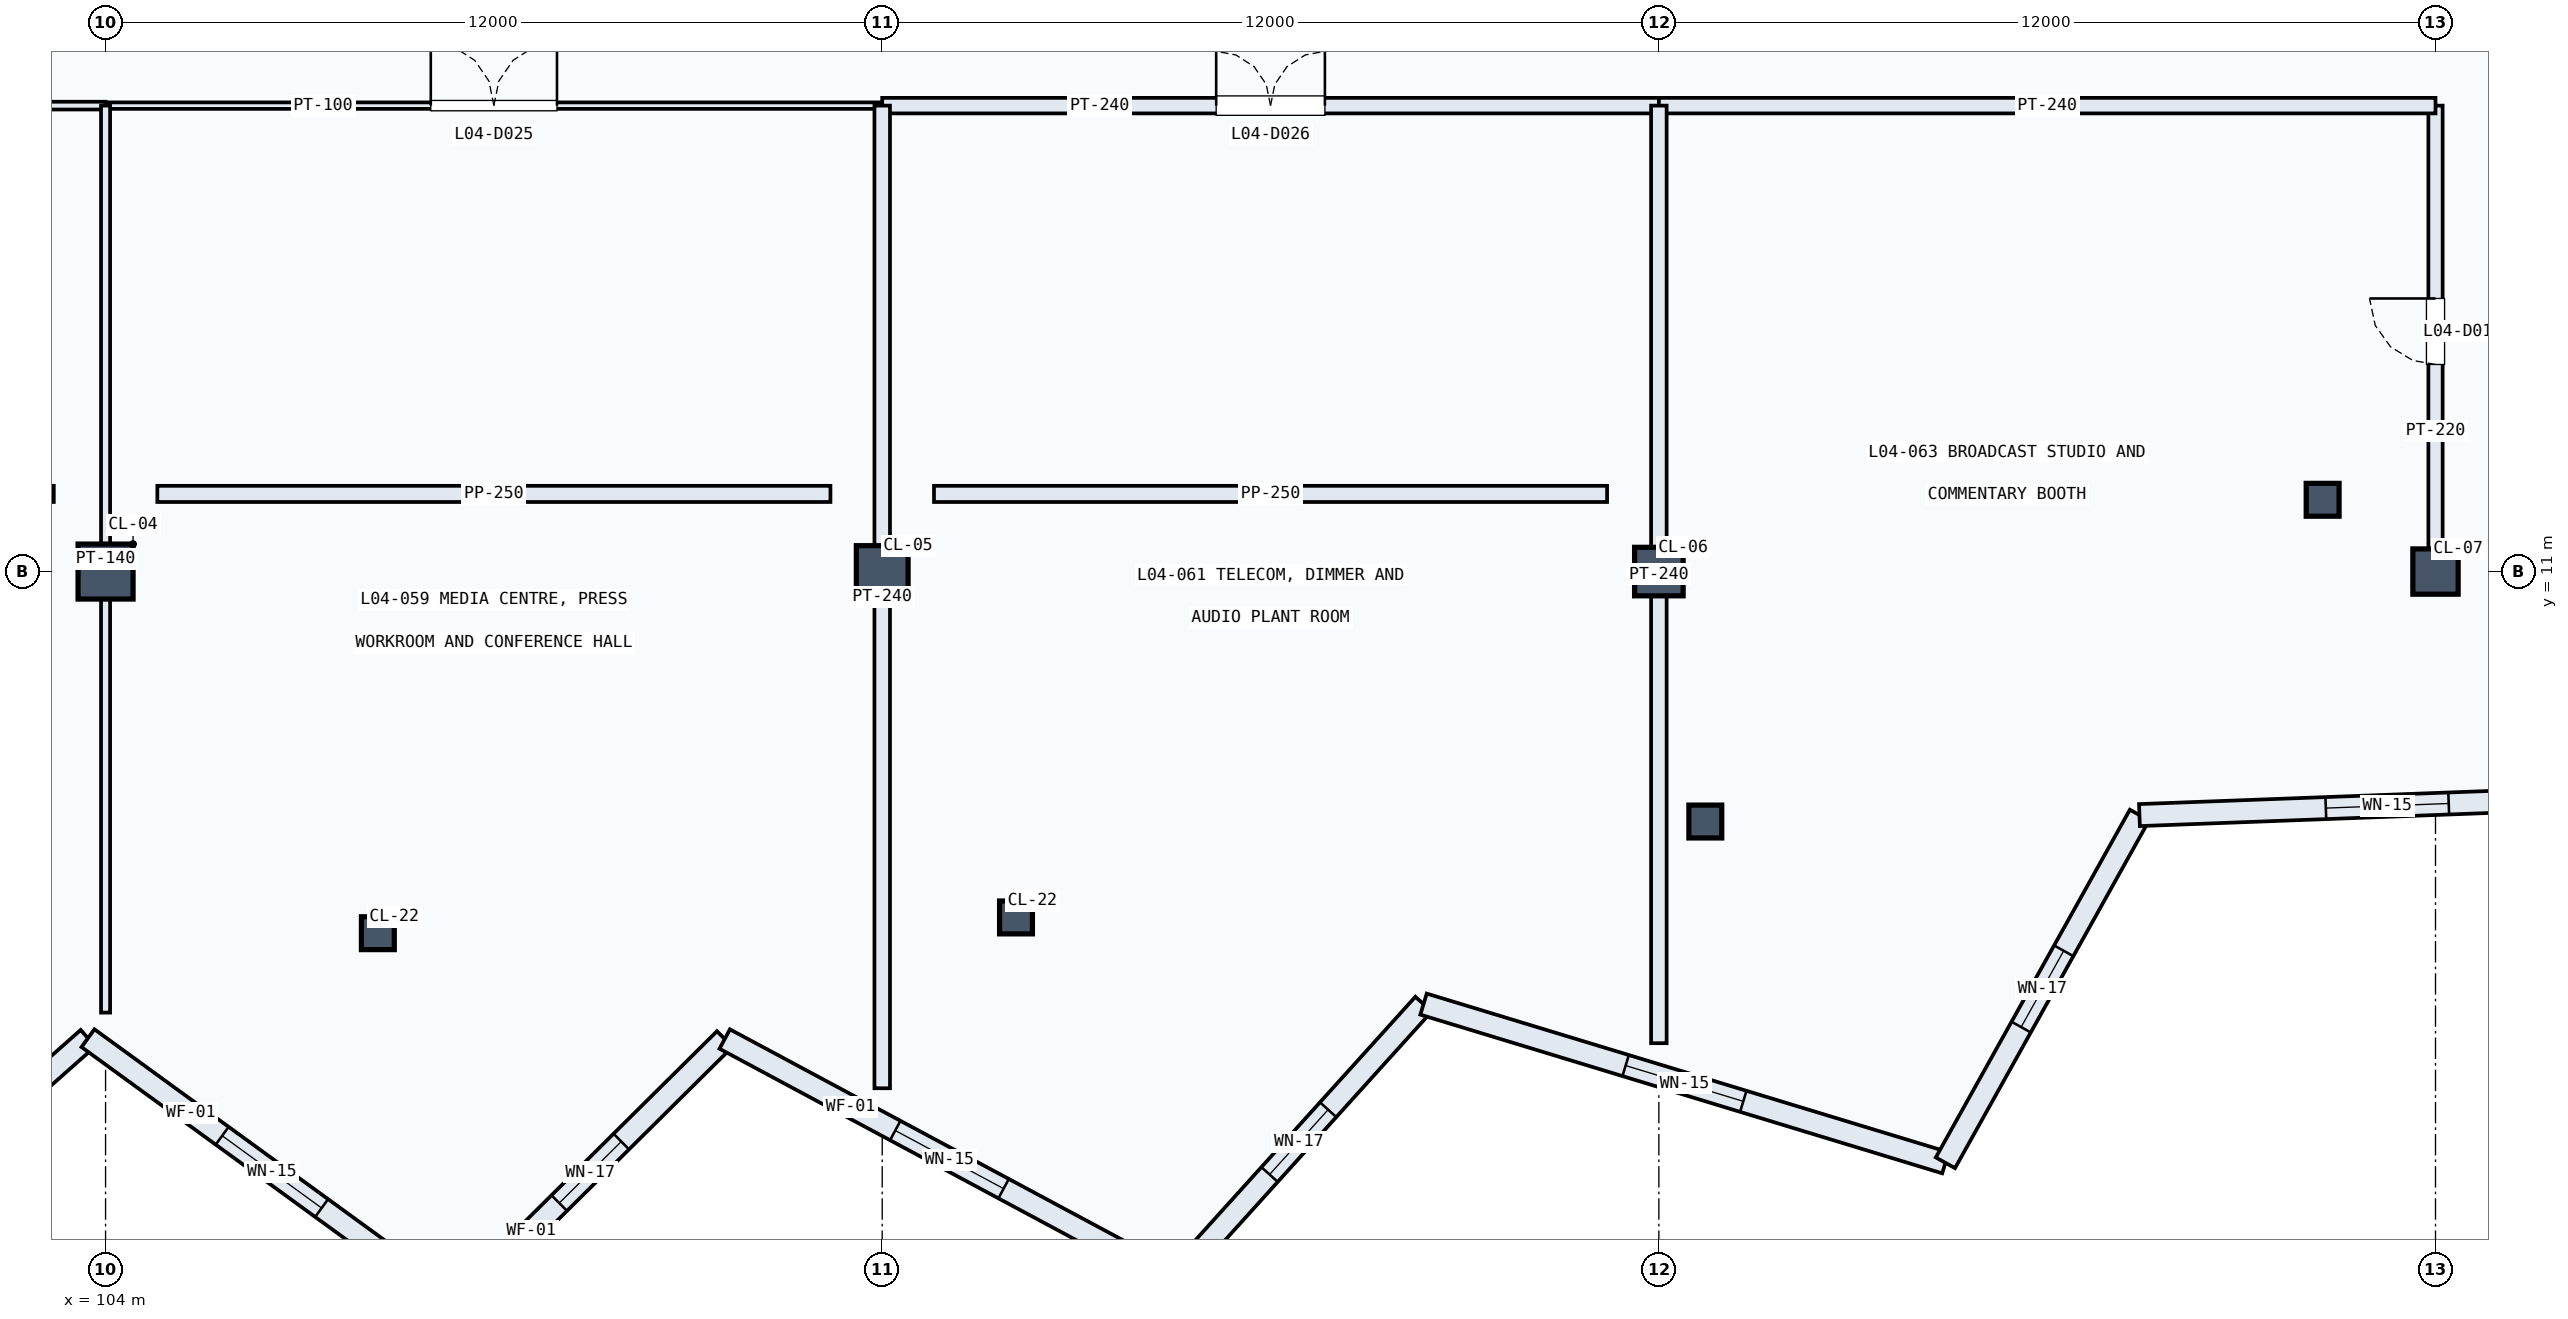
"""IFC4 building model, lengths in metres.
Left out: names, types, materials, properties, quantities, classifications, styles, units other than length and angle.
Written with IfcOpenShell. Run it as: python <this file> out.ifc"""

import sys

from ifc_helpers import new_model, si_unit, direction, frame, frame_2d, origin, origin_2d, place, context, subcontext, project, spatial, rectangle, hollow_circle, extrude, element, fill, save


model = new_model("IFC4")
c1 = context("Model", 3, precision=1e-05, world=origin(), true_north=direction((0.0, 1.0)))
c2 = subcontext(c1, "Body", "Model", "MODEL_VIEW")
j1 = project(units=[si_unit("LENGTHUNIT", "METRE"), si_unit("PLANEANGLEUNIT", "RADIAN")], contexts=[c1])
p1 = place(None, origin())
s1 = spatial("IfcSite", under=j1, at=p1, CompositionType="ELEMENT")
p2 = place(p1, origin())
s2 = spatial("IfcBuilding", under=s1, at=p2, CompositionType="ELEMENT")
p3 = place(p2, frame((0.0, 0.0, 19.5)))
s3 = spatial("IfcBuildingStorey", under=s2, at=p3, CompositionType="ELEMENT", Elevation=19.5)
p4 = place(p3, frame((104.0, 11.0, 0.0), z_axis=(0.0, 0.0, 1.0), x_axis=(1.0, 0.0, 0.0)))
e1 = element("IfcColumn", 1, at=p4, inside=s3, PredefinedType="COLUMN", context=c2, shape_type="SweptSolid", body=[
    extrude(rectangle(XDim=0.85, YDim=0.85, at=origin_2d()), origin(), (0.0, 0.0, 1.0), 4.8),
])
p5 = place(p3, frame((116.0, 11.0, 0.0), z_axis=(0.0, 0.0, 1.0), x_axis=(1.0, 0.0, 0.0)))
e2 = element("IfcColumn", 2, at=p5, inside=s3, PredefinedType="COLUMN", context=c2, shape_type="SweptSolid", body=[
    extrude(rectangle(XDim=0.8, YDim=0.8, at=origin_2d()), origin(), (0.0, 0.0, 1.0), 4.8),
])
p6 = place(p3, frame((128.0, 11.0, 0.0), z_axis=(0.0, 0.0, 1.0), x_axis=(1.0, 0.0, 0.0)))
e3 = element("IfcColumn", 3, at=p6, inside=s3, PredefinedType="COLUMN", context=c2, shape_type="SweptSolid", body=[
    extrude(rectangle(XDim=0.75, YDim=0.75, at=origin_2d()), origin(), (0.0, 0.0, 1.0), 4.8),
])
p7 = place(p3, frame((140.0, 11.0, 0.0), z_axis=(0.0, 0.0, 1.0), x_axis=(1.0, 0.0, 0.0)))
e4 = element("IfcColumn", 4, at=p7, inside=s3, PredefinedType="COLUMN", context=c2, shape_type="SweptSolid", body=[
    extrude(rectangle(XDim=0.7, YDim=0.7, at=origin_2d()), origin(), (0.0, 0.0, 1.0), 4.8),
])
for number, where, z_axis, x_axis in (
    (5, (108.207, 5.412, 0.0), (0.0, 0.0, 1.0), (1.0, 0.0, 0.0)),
    (6, (118.067, 5.655, 0.0), (0.0, 0.0, 1.0), (1.0, 0.0, 0.0)),
    (7, (128.718, 7.137, 0.0), (0.0, 0.0, 1.0), (1.0, 0.0, 0.0)),
    (8, (138.256, 12.109, 0.0), (0.0, 0.0, 1.0), (1.0, 0.0, 0.0)),
):
    element("IfcColumn", number, at=place(p3, frame(where, z_axis=z_axis, x_axis=x_axis)), inside=s3, PredefinedType="COLUMN", context=c2, shape_type="SweptSolid", body=[
        extrude(hollow_circle(Radius=0.254, WallThickness=0.02, at=origin_2d()), origin(), (0.0, 0.0, 1.0), 4.8),
    ])
p8 = place(p3, frame((99.0, -0.4, 0.0), z_axis=(0.0, 0.0, 1.0), x_axis=(0.74844895461, 0.663192402205, 0.0)))
e9 = element("IfcWall", 9, at=p8, inside=s3, PredefinedType="USERDEFINED", context=c2, shape_type="SweptSolid", body=[
    extrude(rectangle(XDim=6.317, YDim=0.34, at=frame_2d((3.159, 0.0))), origin(), (0.0, 0.0, 1.0), 4.455),
])
p9 = place(p8, frame((2.484, 0.0, 0.8)))
e10 = element("IfcOpeningElement", 10, at=p9, cuts=e9, PredefinedType="OPENING", context=c2, shape_type="SweptSolid", body=[
    extrude(rectangle(XDim=1.35, YDim=2.1, at=frame_2d((0.675, 1.05))), frame((0.0, 0.18, 0.0), z_axis=(0.0, -1.0, 0.0), x_axis=(1.0, 0.0, 0.0)), (0.0, 0.0, 1.0), 0.36),
])
p10 = place(p3, frame((103.728, 3.79, 0.0), z_axis=(0.0, 0.0, 1.0), x_axis=(0.808841233488, -0.588027090371, 0.0)))
e11 = element("IfcWall", 11, at=p10, inside=s3, PredefinedType="USERDEFINED", context=c2, shape_type="SweptSolid", body=[
    extrude(rectangle(XDim=7.027, YDim=0.34, at=frame_2d((3.514, 0.0))), origin(), (0.0, 0.0, 1.0), 4.455),
])
p11 = place(p10, frame((2.564, 0.0, 0.85)))
e12 = element("IfcOpeningElement", 12, at=p11, cuts=e11, PredefinedType="OPENING", context=c2, shape_type="SweptSolid", body=[
    extrude(rectangle(XDim=1.9, YDim=1.6, at=frame_2d((0.95, 0.8))), frame((0.0, 0.18, 0.0), z_axis=(0.0, -1.0, 0.0), x_axis=(1.0, 0.0, 0.0)), (0.0, 0.0, 1.0), 0.36),
])
p12 = place(p3, frame((109.412, -0.343, 0.0), z_axis=(0.0, 0.0, 1.0), x_axis=(0.710084208502, 0.704116763638, 0.0)))
e13 = element("IfcWall", 13, at=p12, inside=s3, PredefinedType="USERDEFINED", context=c2, shape_type="SweptSolid", body=[
    extrude(rectangle(XDim=5.85, YDim=0.34, at=frame_2d((2.925, 0.0))), origin(), (0.0, 0.0, 1.0), 4.455),
])
p13 = place(p12, frame((2.25, 0.0, 0.8)))
e14 = element("IfcOpeningElement", 14, at=p13, cuts=e13, PredefinedType="OPENING", context=c2, shape_type="SweptSolid", body=[
    extrude(rectangle(XDim=1.35, YDim=2.1, at=frame_2d((0.675, 1.05))), frame((0.0, 0.18, 0.0), z_axis=(0.0, -1.0, 0.0), x_axis=(1.0, 0.0, 0.0)), (0.0, 0.0, 1.0), 0.36),
])
p14 = place(p3, frame((113.566, 3.777, 0.0), z_axis=(0.0, 0.0, 1.0), x_axis=(0.881201188687, -0.472741435731, 0.0)))
e15 = element("IfcWall", 15, at=p14, inside=s3, PredefinedType="USERDEFINED", context=c2, shape_type="SweptSolid", body=[
    extrude(rectangle(XDim=7.881, YDim=0.34, at=frame_2d((3.94, 0.0))), origin(), (0.0, 0.0, 1.0), 4.455),
])
p15 = place(p14, frame((2.99, 0.0, 0.85)))
e16 = element("IfcOpeningElement", 16, at=p15, cuts=e15, PredefinedType="OPENING", context=c2, shape_type="SweptSolid", body=[
    extrude(rectangle(XDim=1.9, YDim=1.6, at=frame_2d((0.95, 0.8))), frame((0.0, 0.18, 0.0), z_axis=(0.0, -1.0, 0.0), x_axis=(1.0, 0.0, 0.0)), (0.0, 0.0, 1.0), 0.36),
])
p16 = place(p3, frame((120.511, 0.051, 0.0), z_axis=(0.0, 0.0, 1.0), x_axis=(0.670348131104, 0.742046752654, 0.0)))
e17 = element("IfcWall", 17, at=p16, inside=s3, PredefinedType="USERDEFINED", context=c2, shape_type="SweptSolid", body=[
    extrude(rectangle(XDim=5.748, YDim=0.34, at=frame_2d((2.874, 0.0))), origin(), (0.0, 0.0, 1.0), 4.455),
])
p17 = place(p16, frame((2.199, 0.0, 0.8)))
e18 = element("IfcOpeningElement", 18, at=p17, cuts=e17, PredefinedType="OPENING", context=c2, shape_type="SweptSolid", body=[
    extrude(rectangle(XDim=1.35, YDim=2.1, at=frame_2d((0.675, 1.05))), frame((0.0, 0.18, 0.0), z_axis=(0.0, -1.0, 0.0), x_axis=(1.0, 0.0, 0.0)), (0.0, 0.0, 1.0), 0.36),
])
p18 = place(p3, frame((124.364, 4.316, 0.0), z_axis=(0.0, 0.0, 1.0), x_axis=(0.956738407321, -0.290949514446, 0.0)))
e19 = element("IfcWall", 19, at=p18, inside=s3, PredefinedType="USERDEFINED", context=c2, shape_type="SweptSolid", body=[
    extrude(rectangle(XDim=8.428, YDim=0.34, at=frame_2d((4.214, 0.0))), origin(), (0.0, 0.0, 1.0), 4.455),
])
p19 = place(p18, frame((3.264, 0.0, 0.85)))
e20 = element("IfcOpeningElement", 20, at=p19, cuts=e19, PredefinedType="OPENING", context=c2, shape_type="SweptSolid", body=[
    extrude(rectangle(XDim=1.9, YDim=1.6, at=frame_2d((0.95, 0.8))), frame((0.0, 0.18, 0.0), z_axis=(0.0, -1.0, 0.0), x_axis=(1.0, 0.0, 0.0)), (0.0, 0.0, 1.0), 0.36),
])
p20 = place(p3, frame((132.427, 1.864, 0.0), z_axis=(0.0, 0.0, 1.0), x_axis=(0.487306352228, 0.87323108, 0.0)))
e21 = element("IfcWall", 21, at=p20, inside=s3, PredefinedType="USERDEFINED", context=c2, shape_type="SweptSolid", body=[
    extrude(rectangle(XDim=6.153, YDim=0.34, at=frame_2d((3.076, 0.0))), origin(), (0.0, 0.0, 1.0), 4.455),
])
p21 = place(p20, frame((2.402, 0.0, 0.8)))
e22 = element("IfcOpeningElement", 22, at=p21, cuts=e21, PredefinedType="OPENING", context=c2, shape_type="SweptSolid", body=[
    extrude(rectangle(XDim=1.35, YDim=2.1, at=frame_2d((0.675, 1.05))), frame((0.0, 0.18, 0.0), z_axis=(0.0, -1.0, 0.0), x_axis=(1.0, 0.0, 0.0)), (0.0, 0.0, 1.0), 0.36),
])
p22 = place(p3, frame((135.426, 7.237, 0.0), z_axis=(0.0, 0.0, 1.0), x_axis=(0.999297884119, 0.037466502319, 0.0)))
e23 = element("IfcWall", 23, at=p22, inside=s3, PredefinedType="USERDEFINED", context=c2, shape_type="SweptSolid", body=[
    extrude(rectangle(XDim=7.663, YDim=0.34, at=frame_2d((3.832, 0.0))), origin(), (0.0, 0.0, 1.0), 4.455),
])
p23 = place(p22, frame((2.882, 0.0, 0.85)))
e24 = element("IfcOpeningElement", 24, at=p23, cuts=e23, PredefinedType="OPENING", context=c2, shape_type="SweptSolid", body=[
    extrude(rectangle(XDim=1.9, YDim=1.6, at=frame_2d((0.95, 0.8))), frame((0.0, 0.18, 0.0), z_axis=(0.0, -1.0, 0.0), x_axis=(1.0, 0.0, 0.0)), (0.0, 0.0, 1.0), 0.36),
])
p24 = place(p3, frame((94.8, 12.2, 0.0), z_axis=(0.0, 0.0, 1.0), x_axis=(1.0, 0.0, 0.0)))
e25 = element("IfcWall", 25, at=p24, inside=s3, PredefinedType="PARAPET", context=c2, shape_type="SweptSolid", body=[
    extrude(rectangle(XDim=8.4, YDim=0.25, at=frame_2d((4.2, 0.0))), origin(), (0.0, 0.0, 1.0), 0.8),
])
for number, where, z_axis, x_axis in (
    (26, (104.8, 12.2, 0.0), (0.0, 0.0, 1.0), (1.0, 0.0, 0.0)),
    (27, (116.8, 12.2, 0.0), (0.0, 0.0, 1.0), (1.0, 0.0, 0.0)),
):
    element("IfcWall", number, at=place(p3, frame(where, z_axis=z_axis, x_axis=x_axis)), inside=s3, PredefinedType="PARAPET", context=c2, shape_type="SweptSolid", body=[
        extrude(rectangle(XDim=10.4, YDim=0.25, at=frame_2d((5.2, 0.0))), origin(), (0.0, 0.0, 1.0), 0.8),
    ])
p25 = place(p3, frame((140.0, 11.22, 0.0), z_axis=(0.0, 0.0, 1.0), x_axis=(0.0, 1.0, 0.0)))
e28 = element("IfcWall", 28, at=p25, inside=s3, PredefinedType="PARTITIONING", context=c2, shape_type="SweptSolid", body=[
    extrude(rectangle(XDim=6.98, YDim=0.22, at=frame_2d((3.49, 0.0))), origin(), (0.0, 0.0, 1.0), 3.707),
])
p26 = place(p25, frame((2.98, 0.0, 0.0)))
e29 = element("IfcOpeningElement", 29, at=p26, cuts=e28, PredefinedType="OPENING", context=c2, shape_type="SweptSolid", body=[
    extrude(rectangle(XDim=1.02, YDim=2.25, at=frame_2d((0.51, 1.125))), frame((0.0, 0.12, 0.0), z_axis=(0.0, -1.0, 0.0), x_axis=(1.0, 0.0, 0.0)), (0.0, 0.0, 1.0), 0.24),
])
p27 = place(p3, frame((94.0, 18.2, 0.0), z_axis=(0.0, 0.0, 1.0), x_axis=(1.0, 0.0, 0.0)))
e30 = element("IfcWall", 30, at=p27, inside=s3, PredefinedType="PARTITIONING", context=c2, shape_type="SweptSolid", body=[
    extrude(rectangle(XDim=10.0, YDim=0.12, at=frame_2d((5.0, 0.0))), origin(), (0.0, 0.0, 1.0), 3.707),
])
p28 = place(p27, frame((4.48, 0.0, 0.0)))
e31 = element("IfcOpeningElement", 31, at=p28, cuts=e30, PredefinedType="OPENING", context=c2, shape_type="SweptSolid", body=[
    extrude(rectangle(XDim=1.04, YDim=2.2, at=frame_2d((0.52, 1.1))), frame((0.0, 0.07, 0.0), z_axis=(0.0, -1.0, 0.0), x_axis=(1.0, 0.0, 0.0)), (0.0, 0.0, 1.0), 0.14),
])
p29 = place(p3, frame((104.0, 18.2, 0.0), z_axis=(0.0, 0.0, 1.0), x_axis=(1.0, 0.0, 0.0)))
e32 = element("IfcWall", 32, at=p29, inside=s3, PredefinedType="PARTITIONING", context=c2, shape_type="SweptSolid", body=[
    extrude(rectangle(XDim=12.0, YDim=0.1, at=frame_2d((6.0, 0.0))), origin(), (0.0, 0.0, 1.0), 3.49),
])
p30 = place(p29, frame((5.025, 0.0, 0.0)))
e33 = element("IfcOpeningElement", 33, at=p30, cuts=e32, PredefinedType="OPENING", context=c2, shape_type="SweptSolid", body=[
    extrude(rectangle(XDim=1.95, YDim=2.4, at=frame_2d((0.975, 1.2))), frame((0.0, 0.06, 0.0), z_axis=(0.0, -1.0, 0.0), x_axis=(1.0, 0.0, 0.0)), (0.0, 0.0, 1.0), 0.12),
])
p31 = place(p3, frame((116.0, 18.2, 0.0), z_axis=(0.0, 0.0, 1.0), x_axis=(1.0, 0.0, 0.0)))
e34 = element("IfcWall", 34, at=p31, inside=s3, PredefinedType="PARTITIONING", context=c2, shape_type="SweptSolid", body=[
    extrude(rectangle(XDim=12.0, YDim=0.24, at=frame_2d((6.0, 0.0))), origin(), (0.0, 0.0, 1.0), 3.49),
])
p32 = place(p31, frame((5.16, 0.0, 0.0)))
e35 = element("IfcOpeningElement", 35, at=p32, cuts=e34, PredefinedType="OPENING", context=c2, shape_type="SweptSolid", body=[
    extrude(rectangle(XDim=1.68, YDim=2.2, at=frame_2d((0.84, 1.1))), frame((0.0, 0.13, 0.0), z_axis=(0.0, -1.0, 0.0), x_axis=(1.0, 0.0, 0.0)), (0.0, 0.0, 1.0), 0.26),
])
p33 = place(p3, frame((128.0, 18.2, 0.0), z_axis=(0.0, 0.0, 1.0), x_axis=(1.0, 0.0, 0.0)))
e36 = element("IfcWall", 36, at=p33, inside=s3, PredefinedType="PARTITIONING", context=c2, shape_type="SweptSolid", body=[
    extrude(rectangle(XDim=12.0, YDim=0.24, at=frame_2d((6.0, 0.0))), origin(), (0.0, 0.0, 1.0), 3.64),
])
p34 = place(p3, frame((104.0, 4.185, 0.0), z_axis=(0.0, 0.0, 1.0), x_axis=(0.0, 1.0, 0.0)))
e37 = element("IfcWall", 37, at=p34, inside=s3, PredefinedType="PARTITIONING", context=c2, shape_type="SweptSolid", body=[
    extrude(rectangle(XDim=14.015, YDim=0.14, at=frame_2d((7.008, 0.0))), origin(), (0.0, 0.0, 1.0), 3.79),
])
p35 = place(p3, frame((116.0, 3.016, 0.0), z_axis=(0.0, 0.0, 1.0), x_axis=(0.0, 1.0, 0.0)))
e38 = element("IfcWall", 38, at=p35, inside=s3, PredefinedType="PARTITIONING", context=c2, shape_type="SweptSolid", body=[
    extrude(rectangle(XDim=15.184, YDim=0.24, at=frame_2d((7.592, 0.0))), origin(), (0.0, 0.0, 1.0), 3.49),
])
p36 = place(p3, frame((128.0, 3.712, 0.0), z_axis=(0.0, 0.0, 1.0), x_axis=(0.0, 1.0, 0.0)))
e39 = element("IfcWall", 39, at=p36, inside=s3, PredefinedType="PARTITIONING", context=c2, shape_type="SweptSolid", body=[
    extrude(rectangle(XDim=14.488, YDim=0.24, at=frame_2d((7.244, 0.0))), origin(), (0.0, 0.0, 1.0), 3.64),
])
p37 = place(p11, origin())
e40 = element("IfcWindow", 40, at=p37, inside=s3, PartitioningType="SINGLE_PANEL", PredefinedType="WINDOW", context=c2, shape_type="SweptSolid", body=[
    extrude(rectangle(XDim=1.9, YDim=1.6, at=frame_2d((0.95, 0.8))), frame((0.0, 0.03, 0.0), z_axis=(0.0, -1.0, 0.0), x_axis=(1.0, 0.0, 0.0)), (0.0, 0.0, 1.0), 0.06),
])
fill(e12, e40)
p38 = place(p13, origin())
e41 = element("IfcWindow", 41, at=p38, inside=s3, PartitioningType="SINGLE_PANEL", PredefinedType="WINDOW", context=c2, shape_type="SweptSolid", body=[
    extrude(rectangle(XDim=1.35, YDim=2.1, at=frame_2d((0.675, 1.05))), frame((0.0, 0.03, 0.0), z_axis=(0.0, -1.0, 0.0), x_axis=(1.0, 0.0, 0.0)), (0.0, 0.0, 1.0), 0.06),
])
fill(e14, e41)
p39 = place(p15, origin())
e42 = element("IfcWindow", 42, at=p39, inside=s3, PartitioningType="SINGLE_PANEL", PredefinedType="WINDOW", context=c2, shape_type="SweptSolid", body=[
    extrude(rectangle(XDim=1.9, YDim=1.6, at=frame_2d((0.95, 0.8))), frame((0.0, 0.03, 0.0), z_axis=(0.0, -1.0, 0.0), x_axis=(1.0, 0.0, 0.0)), (0.0, 0.0, 1.0), 0.06),
])
fill(e16, e42)
p40 = place(p17, origin())
e43 = element("IfcWindow", 43, at=p40, inside=s3, PartitioningType="SINGLE_PANEL", PredefinedType="WINDOW", context=c2, shape_type="SweptSolid", body=[
    extrude(rectangle(XDim=1.35, YDim=2.1, at=frame_2d((0.675, 1.05))), frame((0.0, 0.03, 0.0), z_axis=(0.0, -1.0, 0.0), x_axis=(1.0, 0.0, 0.0)), (0.0, 0.0, 1.0), 0.06),
])
fill(e18, e43)
p41 = place(p19, origin())
e44 = element("IfcWindow", 44, at=p41, inside=s3, PartitioningType="SINGLE_PANEL", PredefinedType="WINDOW", context=c2, shape_type="SweptSolid", body=[
    extrude(rectangle(XDim=1.9, YDim=1.6, at=frame_2d((0.95, 0.8))), frame((0.0, 0.03, 0.0), z_axis=(0.0, -1.0, 0.0), x_axis=(1.0, 0.0, 0.0)), (0.0, 0.0, 1.0), 0.06),
])
fill(e20, e44)
p42 = place(p21, origin())
e45 = element("IfcWindow", 45, at=p42, inside=s3, PartitioningType="SINGLE_PANEL", PredefinedType="WINDOW", context=c2, shape_type="SweptSolid", body=[
    extrude(rectangle(XDim=1.35, YDim=2.1, at=frame_2d((0.675, 1.05))), frame((0.0, 0.03, 0.0), z_axis=(0.0, -1.0, 0.0), x_axis=(1.0, 0.0, 0.0)), (0.0, 0.0, 1.0), 0.06),
])
fill(e22, e45)
p43 = place(p23, origin())
e46 = element("IfcWindow", 46, at=p43, inside=s3, PartitioningType="SINGLE_PANEL", PredefinedType="WINDOW", context=c2, shape_type="SweptSolid", body=[
    extrude(rectangle(XDim=1.9, YDim=1.6, at=frame_2d((0.95, 0.8))), frame((0.0, 0.03, 0.0), z_axis=(0.0, -1.0, 0.0), x_axis=(1.0, 0.0, 0.0)), (0.0, 0.0, 1.0), 0.06),
])
fill(e24, e46)
p44 = place(p26, origin())
e47 = element("IfcDoor", 47, at=p44, inside=s3, OperationType="SINGLE_SWING_RIGHT", PredefinedType="DOOR", context=c2, shape_type="SweptSolid", body=[
    extrude(rectangle(XDim=1.02, YDim=2.25, at=frame_2d((0.51, 1.125))), frame((0.0, 0.025, 0.0), z_axis=(0.0, -1.0, 0.0), x_axis=(1.0, 0.0, 0.0)), (0.0, 0.0, 1.0), 0.05),
])
fill(e29, e47)
p45 = place(p30, origin())
e48 = element("IfcDoor", 48, at=p45, inside=s3, OperationType="DOUBLE_DOOR_SINGLE_SWING", PredefinedType="DOOR", context=c2, shape_type="SweptSolid", body=[
    extrude(rectangle(XDim=1.95, YDim=2.4, at=frame_2d((0.975, 1.2))), frame((0.0, 0.025, 0.0), z_axis=(0.0, -1.0, 0.0), x_axis=(1.0, 0.0, 0.0)), (0.0, 0.0, 1.0), 0.05),
])
fill(e33, e48)
p46 = place(p32, origin())
e49 = element("IfcDoor", 49, at=p46, inside=s3, OperationType="DOUBLE_DOOR_SINGLE_SWING", PredefinedType="DOOR", context=c2, shape_type="SweptSolid", body=[
    extrude(rectangle(XDim=1.68, YDim=2.2, at=frame_2d((0.84, 1.1))), frame((0.0, 0.025, 0.0), z_axis=(0.0, -1.0, 0.0), x_axis=(1.0, 0.0, 0.0)), (0.0, 0.0, 1.0), 0.05),
])
fill(e35, e49)
save(model, sys.argv[1])
